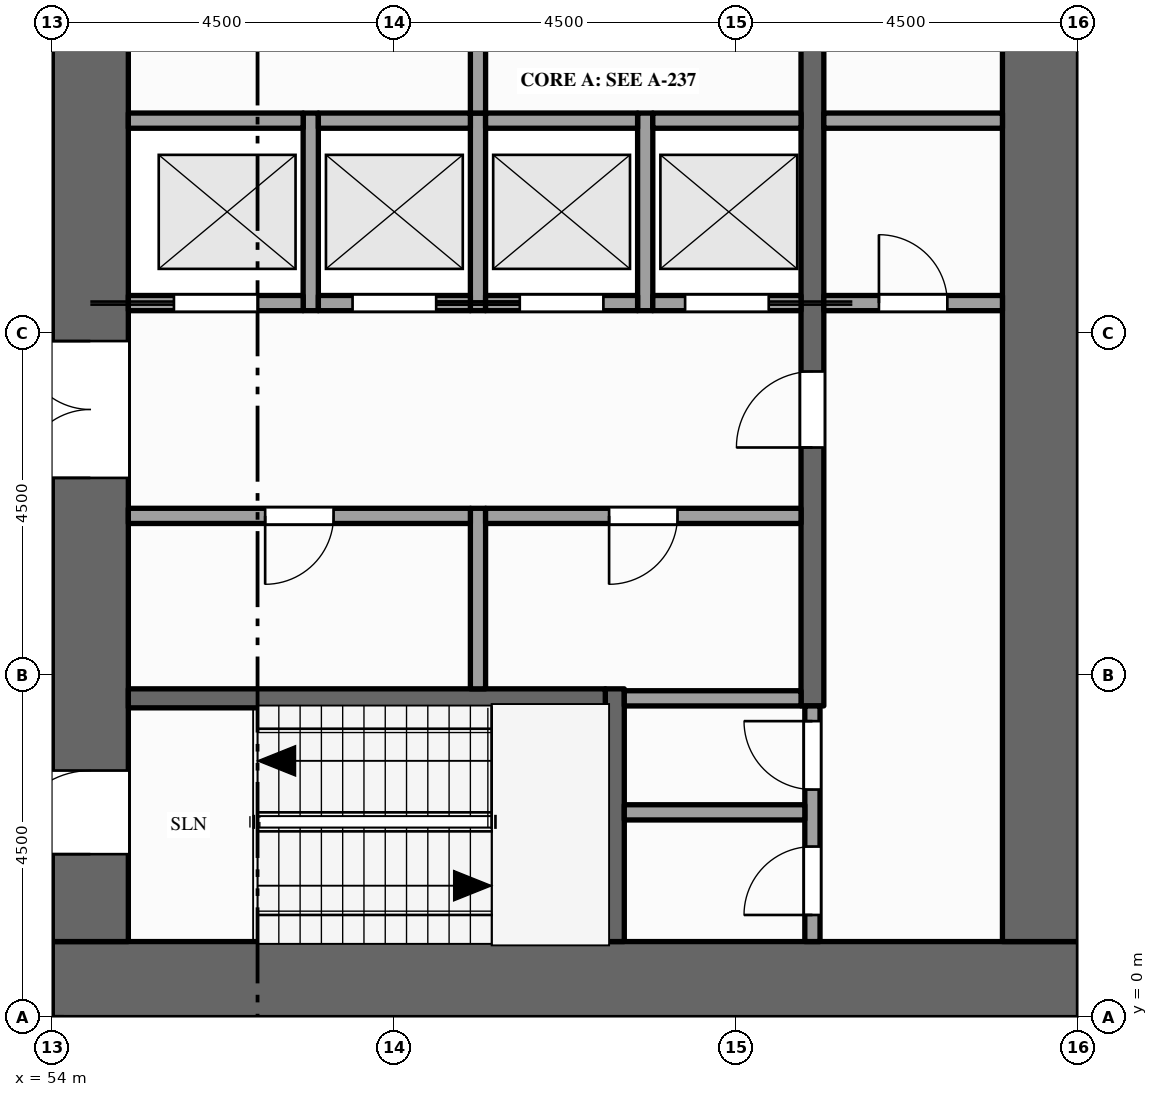
"""IFC4 building model, lengths in metres.
Left out: names, types, materials, properties, quantities, classifications, styles, units other than length and angle.
Written with IfcOpenShell. Run it as: python <this file> out.ifc"""

import sys

from ifc_helpers import new_model, si_unit, direction, frame, frame_2d, origin, place, context, subcontext, project, spatial, rectangle, extrude, element, fill, save


model = new_model("IFC4")
c1 = context("Model", 3, precision=1e-05, world=origin(), true_north=direction((0.0, 1.0)))
c2 = subcontext(c1, "Body", "Model", "MODEL_VIEW")
j1 = project(units=[si_unit("LENGTHUNIT", "METRE"), si_unit("PLANEANGLEUNIT", "RADIAN")], contexts=[c1])
p1 = place(None, origin())
s1 = spatial("IfcSite", under=j1, at=p1, CompositionType="ELEMENT")
p2 = place(p1, origin())
s2 = spatial("IfcBuilding", under=s1, at=p2, CompositionType="ELEMENT")
p3 = place(p2, frame((0.0, 0.0, 207.0)))
s3 = spatial("IfcBuildingStorey", under=s2, at=p3, CompositionType="ELEMENT", Elevation=207.0)
p4 = place(p3, frame((67.5, 0.5, -0.15), z_axis=(0.0, 0.0, 1.0), x_axis=(-1.0, 0.0, 0.0)))
e1 = element("IfcWall", 1, at=p4, inside=s3, PredefinedType="SHEAR", context=c2, shape_type="SweptSolid", body=[
    extrude(rectangle(XDim=13.5, YDim=1.0, at=frame_2d((6.75, 0.0))), origin(), (0.0, 0.0, 1.0), 4.0),
])
p5 = place(p3, frame((54.5, 1.0, -0.15), z_axis=(0.0, 0.0, 1.0), x_axis=(0.0, 1.0, 0.0)))
e2 = element("IfcWall", 2, at=p5, inside=s3, PredefinedType="SHEAR", context=c2, shape_type="SweptSolid", body=[
    extrude(rectangle(XDim=20.5, YDim=1.0, at=frame_2d((10.25, 0.0))), origin(), (0.0, 0.0, 1.0), 4.0),
])
p6 = place(p5, frame((6.1, 0.0, 0.15)))
e3 = element("IfcOpeningElement", 3, at=p6, cuts=e2, PredefinedType="OPENING", context=c2, shape_type="SweptSolid", body=[
    extrude(rectangle(XDim=1.8, YDim=2.1, at=frame_2d((0.9, 1.05))), frame((0.0, 0.51, 0.0), z_axis=(0.0, -1.0, 0.0), x_axis=(1.0, 0.0, 0.0)), (0.0, 0.0, 1.0), 1.02),
])
p7 = place(p5, frame((12.15, 0.0, 0.15)))
e4 = element("IfcOpeningElement", 4, at=p7, cuts=e2, PredefinedType="OPENING", context=c2, shape_type="SweptSolid", body=[
    extrude(rectangle(XDim=1.1, YDim=2.1, at=frame_2d((0.55, 1.05))), frame((0.0, 0.51, 0.0), z_axis=(0.0, -1.0, 0.0), x_axis=(1.0, 0.0, 0.0)), (0.0, 0.0, 1.0), 1.02),
])
p8 = place(p5, frame((1.15, 0.0, 0.15)))
e5 = element("IfcOpeningElement", 5, at=p8, cuts=e2, PredefinedType="OPENING", context=c2, shape_type="SweptSolid", body=[
    extrude(rectangle(XDim=1.1, YDim=2.1, at=frame_2d((0.55, 1.05))), frame((0.0, 0.51, 0.0), z_axis=(0.0, -1.0, 0.0), x_axis=(1.0, 0.0, 0.0)), (0.0, 0.0, 1.0), 1.02),
])
p9 = place(p5, frame((18.35, 0.0, 0.15)))
e6 = element("IfcOpeningElement", 6, at=p9, cuts=e2, PredefinedType="OPENING", context=c2, shape_type="SweptSolid", body=[
    extrude(rectangle(XDim=1.1, YDim=2.1, at=frame_2d((0.55, 1.05))), frame((0.0, 0.51, 0.0), z_axis=(0.0, -1.0, 0.0), x_axis=(1.0, 0.0, 0.0)), (0.0, 0.0, 1.0), 1.02),
])
p10 = place(p3, frame((67.0, 1.0, -0.15), z_axis=(0.0, 0.0, 1.0), x_axis=(0.0, 1.0, 0.0)))
e7 = element("IfcWall", 7, at=p10, inside=s3, PredefinedType="SHEAR", context=c2, shape_type="SweptSolid", body=[
    extrude(rectangle(XDim=20.5, YDim=1.0, at=frame_2d((10.25, 0.0))), origin(), (0.0, 0.0, 1.0), 4.0),
])
p11 = place(p3, frame((57.4, 9.3, 0.0), z_axis=(0.0, 0.0, 1.0), x_axis=(0.0, 1.0, 0.0)))
e8 = element("IfcWall", 8, at=p11, inside=s3, PredefinedType="SOLIDWALL", context=c2, shape_type="SweptSolid", body=[
    extrude(rectangle(XDim=2.6, YDim=0.2, at=frame_2d((1.3, 0.0))), origin(), (0.0, 0.0, 1.0), 3.85),
])
p12 = place(p3, frame((59.6, 4.325, 0.0), z_axis=(0.0, 0.0, 1.0), x_axis=(0.0, 1.0, 0.0)))
e9 = element("IfcWall", 9, at=p12, inside=s3, PredefinedType="PARTITIONING", context=c2, shape_type="SweptSolid", body=[
    extrude(rectangle(XDim=2.375, YDim=0.2, at=frame_2d((1.188, 0.0))), origin(), (0.0, 0.0, 1.0), 3.85),
])
p13 = place(p3, frame((59.6, 9.3, 0.0), z_axis=(0.0, 0.0, 1.0), x_axis=(0.0, 1.0, 0.0)))
e10 = element("IfcWall", 10, at=p13, inside=s3, PredefinedType="SOLIDWALL", context=c2, shape_type="SweptSolid", body=[
    extrude(rectangle(XDim=2.6, YDim=0.2, at=frame_2d((1.3, 0.0))), origin(), (0.0, 0.0, 1.0), 3.85),
])
p14 = place(p3, frame((59.6, 11.9, 0.0), z_axis=(0.0, 0.0, 1.0), x_axis=(0.0, 1.0, 0.0)))
e11 = element("IfcWall", 11, at=p14, inside=s3, PredefinedType="PARTITIONING", context=c2, shape_type="SweptSolid", body=[
    extrude(rectangle(XDim=3.6, YDim=0.2, at=frame_2d((1.8, 0.0))), origin(), (0.0, 0.0, 1.0), 3.85),
])
p15 = place(p14, frame((1.3, 0.0, 0.0)))
e12 = element("IfcOpeningElement", 12, at=p15, cuts=e11, PredefinedType="OPENING", context=c2, shape_type="SweptSolid", body=[
    extrude(rectangle(XDim=1.0, YDim=2.1, at=frame_2d((0.5, 1.05))), frame((0.0, 0.11, 0.0), z_axis=(0.0, -1.0, 0.0), x_axis=(1.0, 0.0, 0.0)), (0.0, 0.0, 1.0), 0.22),
])
p16 = place(p3, frame((61.4, 1.0, 0.0), z_axis=(0.0, 0.0, 1.0), x_axis=(0.0, 1.0, 0.0)))
e13 = element("IfcWall", 13, at=p16, inside=s3, PredefinedType="SHEAR", context=c2, shape_type="SweptSolid", body=[
    extrude(rectangle(XDim=3.325, YDim=0.25, at=frame_2d((1.663, 0.0))), origin(), (0.0, 0.0, 1.0), 3.85),
])
p17 = place(p3, frame((61.8, 9.3, 0.0), z_axis=(0.0, 0.0, 1.0), x_axis=(0.0, 1.0, 0.0)))
e14 = element("IfcWall", 14, at=p17, inside=s3, PredefinedType="SOLIDWALL", context=c2, shape_type="SweptSolid", body=[
    extrude(rectangle(XDim=2.6, YDim=0.2, at=frame_2d((1.3, 0.0))), origin(), (0.0, 0.0, 1.0), 3.85),
])
p18 = place(p3, frame((64.0, 1.0, 0.0), z_axis=(0.0, 0.0, 1.0), x_axis=(0.0, 1.0, 0.0)))
e15 = element("IfcWall", 15, at=p18, inside=s3, PredefinedType="PARTITIONING", context=c2, shape_type="SweptSolid", body=[
    extrude(rectangle(XDim=3.1, YDim=0.2, at=frame_2d((1.55, 0.0))), origin(), (0.0, 0.0, 1.0), 3.85),
])
p19 = place(p18, frame((0.35, 0.0, 0.0)))
e16 = element("IfcOpeningElement", 16, at=p19, cuts=e15, PredefinedType="OPENING", context=c2, shape_type="SweptSolid", body=[
    extrude(rectangle(XDim=0.9, YDim=2.1, at=frame_2d((0.45, 1.05))), frame((0.0, 0.11, 0.0), z_axis=(0.0, -1.0, 0.0), x_axis=(1.0, 0.0, 0.0)), (0.0, 0.0, 1.0), 0.22),
])
p20 = place(p18, frame((2.0, 0.0, 0.0)))
e17 = element("IfcOpeningElement", 17, at=p20, cuts=e15, PredefinedType="OPENING", context=c2, shape_type="SweptSolid", body=[
    extrude(rectangle(XDim=0.9, YDim=2.1, at=frame_2d((0.45, 1.05))), frame((0.0, 0.11, 0.0), z_axis=(0.0, -1.0, 0.0), x_axis=(1.0, 0.0, 0.0)), (0.0, 0.0, 1.0), 0.22),
])
p21 = place(p3, frame((64.0, 4.1, 0.0), z_axis=(0.0, 0.0, 1.0), x_axis=(0.0, 1.0, 0.0)))
e18 = element("IfcWall", 18, at=p21, inside=s3, PredefinedType="SHEAR", context=c2, shape_type="SweptSolid", body=[
    extrude(rectangle(XDim=14.5, YDim=0.3, at=frame_2d((7.25, 0.0))), origin(), (0.0, 0.0, 1.0), 3.85),
])
p22 = place(p21, frame((3.4, 0.0, 0.0)))
e19 = element("IfcOpeningElement", 19, at=p22, cuts=e18, PredefinedType="OPENING", context=c2, shape_type="SweptSolid", body=[
    extrude(rectangle(XDim=1.0, YDim=2.1, at=frame_2d((0.5, 1.05))), frame((0.0, 0.16, 0.0), z_axis=(0.0, -1.0, 0.0), x_axis=(1.0, 0.0, 0.0)), (0.0, 0.0, 1.0), 0.32),
])
p23 = place(p21, frame((9.1, 0.0, 0.0)))
e20 = element("IfcOpeningElement", 20, at=p23, cuts=e18, PredefinedType="OPENING", context=c2, shape_type="SweptSolid", body=[
    extrude(rectangle(XDim=1.0, YDim=2.1, at=frame_2d((0.5, 1.05))), frame((0.0, 0.16, 0.0), z_axis=(0.0, -1.0, 0.0), x_axis=(1.0, 0.0, 0.0)), (0.0, 0.0, 1.0), 0.32),
])
p24 = place(p3, frame((61.525, 2.7, 0.0), z_axis=(0.0, 0.0, 1.0), x_axis=(1.0, 0.0, 0.0)))
e21 = element("IfcWall", 21, at=p24, inside=s3, PredefinedType="PARTITIONING", context=c2, shape_type="SweptSolid", body=[
    extrude(rectangle(XDim=2.375, YDim=0.2, at=frame_2d((1.188, 0.0))), origin(), (0.0, 0.0, 1.0), 3.85),
])
p25 = place(p3, frame((55.0, 4.2, 0.0), z_axis=(0.0, 0.0, 1.0), x_axis=(1.0, 0.0, 0.0)))
e22 = element("IfcWall", 22, at=p25, inside=s3, PredefinedType="SHEAR", context=c2, shape_type="SweptSolid", body=[
    extrude(rectangle(XDim=6.275, YDim=0.25, at=frame_2d((3.137, 0.0))), origin(), (0.0, 0.0, 1.0), 3.85),
])
p26 = place(p3, frame((61.525, 4.2, 0.0), z_axis=(0.0, 0.0, 1.0), x_axis=(1.0, 0.0, 0.0)))
e23 = element("IfcWall", 23, at=p26, inside=s3, PredefinedType="PARTITIONING", context=c2, shape_type="SweptSolid", body=[
    extrude(rectangle(XDim=2.325, YDim=0.2, at=frame_2d((1.163, 0.0))), origin(), (0.0, 0.0, 1.0), 3.85),
])
p27 = place(p3, frame((55.0, 6.6, 0.0), z_axis=(0.0, 0.0, 1.0), x_axis=(1.0, 0.0, 0.0)))
e24 = element("IfcWall", 24, at=p27, inside=s3, PredefinedType="PARTITIONING", context=c2, shape_type="SweptSolid", body=[
    extrude(rectangle(XDim=4.5, YDim=0.2, at=frame_2d((2.25, 0.0))), origin(), (0.0, 0.0, 1.0), 3.85),
])
p28 = place(p27, frame((1.8, 0.0, 0.0)))
e25 = element("IfcOpeningElement", 25, at=p28, cuts=e24, PredefinedType="OPENING", context=c2, shape_type="SweptSolid", body=[
    extrude(rectangle(XDim=0.9, YDim=2.1, at=frame_2d((0.45, 1.05))), frame((0.0, 0.11, 0.0), z_axis=(0.0, -1.0, 0.0), x_axis=(1.0, 0.0, 0.0)), (0.0, 0.0, 1.0), 0.22),
])
p29 = place(p3, frame((59.7, 6.6, 0.0), z_axis=(0.0, 0.0, 1.0), x_axis=(1.0, 0.0, 0.0)))
e26 = element("IfcWall", 26, at=p29, inside=s3, PredefinedType="PARTITIONING", context=c2, shape_type="SweptSolid", body=[
    extrude(rectangle(XDim=4.15, YDim=0.2, at=frame_2d((2.075, 0.0))), origin(), (0.0, 0.0, 1.0), 3.85),
])
p30 = place(p29, frame((1.625, 0.0, 0.0)))
e27 = element("IfcOpeningElement", 27, at=p30, cuts=e26, PredefinedType="OPENING", context=c2, shape_type="SweptSolid", body=[
    extrude(rectangle(XDim=0.9, YDim=2.1, at=frame_2d((0.45, 1.05))), frame((0.0, 0.11, 0.0), z_axis=(0.0, -1.0, 0.0), x_axis=(1.0, 0.0, 0.0)), (0.0, 0.0, 1.0), 0.22),
])
p31 = place(p3, frame((55.0, 9.4, 0.0), z_axis=(0.0, 0.0, 1.0), x_axis=(1.0, 0.0, 0.0)))
e28 = element("IfcWall", 28, at=p31, inside=s3, PredefinedType="SOLIDWALL", context=c2, shape_type="SweptSolid", body=[
    extrude(rectangle(XDim=2.3, YDim=0.2, at=frame_2d((1.15, 0.0))), origin(), (0.0, 0.0, 1.0), 3.85),
])
p32 = place(p31, frame((0.6, 0.0, 0.012)))
e29 = element("IfcOpeningElement", 29, at=p32, cuts=e28, PredefinedType="OPENING", context=c2, shape_type="SweptSolid", body=[
    extrude(rectangle(XDim=1.1, YDim=2.1, at=frame_2d((0.55, 1.05))), frame((0.0, 0.11, 0.0), z_axis=(0.0, -1.0, 0.0), x_axis=(1.0, 0.0, 0.0)), (0.0, 0.0, 1.0), 0.22),
])
p33 = place(p3, frame((57.5, 9.4, 0.0), z_axis=(0.0, 0.0, 1.0), x_axis=(1.0, 0.0, 0.0)))
e30 = element("IfcWall", 30, at=p33, inside=s3, PredefinedType="SOLIDWALL", context=c2, shape_type="SweptSolid", body=[
    extrude(rectangle(XDim=2.0, YDim=0.2, at=frame_2d((1.0, 0.0))), origin(), (0.0, 0.0, 1.0), 3.85),
])
p34 = place(p33, frame((0.45, 0.0, 0.012)))
e31 = element("IfcOpeningElement", 31, at=p34, cuts=e30, PredefinedType="OPENING", context=c2, shape_type="SweptSolid", body=[
    extrude(rectangle(XDim=1.1, YDim=2.1, at=frame_2d((0.55, 1.05))), frame((0.0, 0.11, 0.0), z_axis=(0.0, -1.0, 0.0), x_axis=(1.0, 0.0, 0.0)), (0.0, 0.0, 1.0), 0.22),
])
p35 = place(p3, frame((59.7, 9.4, 0.0), z_axis=(0.0, 0.0, 1.0), x_axis=(1.0, 0.0, 0.0)))
e32 = element("IfcWall", 32, at=p35, inside=s3, PredefinedType="SOLIDWALL", context=c2, shape_type="SweptSolid", body=[
    extrude(rectangle(XDim=2.0, YDim=0.2, at=frame_2d((1.0, 0.0))), origin(), (0.0, 0.0, 1.0), 3.85),
])
p36 = place(p35, frame((0.45, 0.0, 0.012)))
e33 = element("IfcOpeningElement", 33, at=p36, cuts=e32, PredefinedType="OPENING", context=c2, shape_type="SweptSolid", body=[
    extrude(rectangle(XDim=1.1, YDim=2.1, at=frame_2d((0.55, 1.05))), frame((0.0, 0.11, 0.0), z_axis=(0.0, -1.0, 0.0), x_axis=(1.0, 0.0, 0.0)), (0.0, 0.0, 1.0), 0.22),
])
p37 = place(p3, frame((61.9, 9.4, 0.0), z_axis=(0.0, 0.0, 1.0), x_axis=(1.0, 0.0, 0.0)))
e34 = element("IfcWall", 34, at=p37, inside=s3, PredefinedType="SOLIDWALL", context=c2, shape_type="SweptSolid", body=[
    extrude(rectangle(XDim=1.95, YDim=0.2, at=frame_2d((0.975, 0.0))), origin(), (0.0, 0.0, 1.0), 3.85),
])
p38 = place(p37, frame((0.425, 0.0, 0.012)))
e35 = element("IfcOpeningElement", 35, at=p38, cuts=e34, PredefinedType="OPENING", context=c2, shape_type="SweptSolid", body=[
    extrude(rectangle(XDim=1.1, YDim=2.1, at=frame_2d((0.55, 1.05))), frame((0.0, 0.11, 0.0), z_axis=(0.0, -1.0, 0.0), x_axis=(1.0, 0.0, 0.0)), (0.0, 0.0, 1.0), 0.22),
])
p39 = place(p3, frame((64.15, 9.4, 0.0), z_axis=(0.0, 0.0, 1.0), x_axis=(1.0, 0.0, 0.0)))
e36 = element("IfcWall", 36, at=p39, inside=s3, PredefinedType="PARTITIONING", context=c2, shape_type="SweptSolid", body=[
    extrude(rectangle(XDim=2.35, YDim=0.2, at=frame_2d((1.175, 0.0))), origin(), (0.0, 0.0, 1.0), 3.85),
])
p40 = place(p39, frame((0.725, 0.0, 0.0)))
e37 = element("IfcOpeningElement", 37, at=p40, cuts=e36, PredefinedType="OPENING", context=c2, shape_type="SweptSolid", body=[
    extrude(rectangle(XDim=0.9, YDim=2.1, at=frame_2d((0.45, 1.05))), frame((0.0, 0.11, 0.0), z_axis=(0.0, -1.0, 0.0), x_axis=(1.0, 0.0, 0.0)), (0.0, 0.0, 1.0), 0.22),
])
p41 = place(p3, frame((55.0, 11.8, 0.0), z_axis=(0.0, 0.0, 1.0), x_axis=(1.0, 0.0, 0.0)))
e38 = element("IfcWall", 38, at=p41, inside=s3, PredefinedType="SOLIDWALL", context=c2, shape_type="SweptSolid", body=[
    extrude(rectangle(XDim=2.3, YDim=0.2, at=frame_2d((1.15, 0.0))), origin(), (0.0, 0.0, 1.0), 3.85),
])
for number, where, z_axis, x_axis in (
    (39, (57.5, 11.8, 0.0), (0.0, 0.0, 1.0), (1.0, 0.0, 0.0)),
    (40, (59.7, 11.8, 0.0), (0.0, 0.0, 1.0), (1.0, 0.0, 0.0)),
):
    element("IfcWall", number, at=place(p3, frame(where, z_axis=z_axis, x_axis=x_axis)), inside=s3, PredefinedType="SOLIDWALL", context=c2, shape_type="SweptSolid", body=[
        extrude(rectangle(XDim=2.0, YDim=0.2, at=frame_2d((1.0, 0.0))), origin(), (0.0, 0.0, 1.0), 3.85),
    ])
p42 = place(p3, frame((61.9, 11.8, 0.0), z_axis=(0.0, 0.0, 1.0), x_axis=(1.0, 0.0, 0.0)))
e41 = element("IfcWall", 41, at=p42, inside=s3, PredefinedType="SOLIDWALL", context=c2, shape_type="SweptSolid", body=[
    extrude(rectangle(XDim=1.95, YDim=0.2, at=frame_2d((0.975, 0.0))), origin(), (0.0, 0.0, 1.0), 3.85),
])
p43 = place(p3, frame((64.15, 11.8, 0.0), z_axis=(0.0, 0.0, 1.0), x_axis=(1.0, 0.0, 0.0)))
e42 = element("IfcWall", 42, at=p43, inside=s3, PredefinedType="PARTITIONING", context=c2, shape_type="SweptSolid", body=[
    extrude(rectangle(XDim=2.35, YDim=0.2, at=frame_2d((1.175, 0.0))), origin(), (0.0, 0.0, 1.0), 3.85),
])
p44 = place(p32, origin())
e43 = element("IfcDoor", 43, at=p44, inside=s3, OperationType="SLIDING_TO_LEFT", PredefinedType="DOOR", context=c2, shape_type="SweptSolid", body=[
    extrude(rectangle(XDim=1.1, YDim=2.1, at=frame_2d((0.55, 1.05))), frame((0.0, 0.025, 0.0), z_axis=(0.0, -1.0, 0.0), x_axis=(1.0, 0.0, 0.0)), (0.0, 0.0, 1.0), 0.05),
])
fill(e29, e43)
p45 = place(p34, origin())
e44 = element("IfcDoor", 44, at=p45, inside=s3, OperationType="SLIDING_TO_RIGHT", PredefinedType="DOOR", context=c2, shape_type="SweptSolid", body=[
    extrude(rectangle(XDim=1.1, YDim=2.1, at=frame_2d((0.55, 1.05))), frame((0.0, 0.025, 0.0), z_axis=(0.0, -1.0, 0.0), x_axis=(1.0, 0.0, 0.0)), (0.0, 0.0, 1.0), 0.05),
])
fill(e31, e44)
p46 = place(p36, origin())
e45 = element("IfcDoor", 45, at=p46, inside=s3, OperationType="SLIDING_TO_LEFT", PredefinedType="DOOR", context=c2, shape_type="SweptSolid", body=[
    extrude(rectangle(XDim=1.1, YDim=2.1, at=frame_2d((0.55, 1.05))), frame((0.0, 0.025, 0.0), z_axis=(0.0, -1.0, 0.0), x_axis=(1.0, 0.0, 0.0)), (0.0, 0.0, 1.0), 0.05),
])
fill(e33, e45)
p47 = place(p38, origin())
e46 = element("IfcDoor", 46, at=p47, inside=s3, OperationType="SLIDING_TO_RIGHT", PredefinedType="DOOR", context=c2, shape_type="SweptSolid", body=[
    extrude(rectangle(XDim=1.1, YDim=2.1, at=frame_2d((0.55, 1.05))), frame((0.0, 0.025, 0.0), z_axis=(0.0, -1.0, 0.0), x_axis=(1.0, 0.0, 0.0)), (0.0, 0.0, 1.0), 0.05),
])
fill(e35, e46)
p48 = place(p6, origin())
e47 = element("IfcDoor", 47, at=p48, inside=s3, OperationType="DOUBLE_DOOR_SINGLE_SWING", PredefinedType="DOOR", context=c2, shape_type="SweptSolid", body=[
    extrude(rectangle(XDim=1.8, YDim=2.1, at=frame_2d((0.9, 1.05))), frame((0.0, 0.025, 0.0), z_axis=(0.0, -1.0, 0.0), x_axis=(1.0, 0.0, 0.0)), (0.0, 0.0, 1.0), 0.05),
])
fill(e3, e47)
p49 = place(p22, origin())
e48 = element("IfcDoor", 48, at=p49, inside=s3, OperationType="SINGLE_SWING_LEFT", PredefinedType="DOOR", context=c2, shape_type="SweptSolid", body=[
    extrude(rectangle(XDim=1.0, YDim=2.1, at=frame_2d((0.5, 1.05))), frame((0.0, 0.025, 0.0), z_axis=(0.0, -1.0, 0.0), x_axis=(1.0, 0.0, 0.0)), (0.0, 0.0, 1.0), 0.05),
])
fill(e19, e48)
p50 = place(p40, origin())
e49 = element("IfcDoor", 49, at=p50, inside=s3, OperationType="SINGLE_SWING_LEFT", PredefinedType="DOOR", context=c2, shape_type="SweptSolid", body=[
    extrude(rectangle(XDim=0.9, YDim=2.1, at=frame_2d((0.45, 1.05))), frame((0.0, 0.025, 0.0), z_axis=(0.0, -1.0, 0.0), x_axis=(1.0, 0.0, 0.0)), (0.0, 0.0, 1.0), 0.05),
])
fill(e37, e49)
p51 = place(p8, origin())
e50 = element("IfcDoor", 50, at=p51, inside=s3, OperationType="SINGLE_SWING_LEFT", PredefinedType="DOOR", context=c2, shape_type="SweptSolid", body=[
    extrude(rectangle(XDim=1.1, YDim=2.1, at=frame_2d((0.55, 1.05))), frame((0.0, 0.025, 0.0), z_axis=(0.0, -1.0, 0.0), x_axis=(1.0, 0.0, 0.0)), (0.0, 0.0, 1.0), 0.05),
])
fill(e5, e50)
p52 = place(p19, origin())
e51 = element("IfcDoor", 51, at=p52, inside=s3, OperationType="SINGLE_SWING_LEFT", PredefinedType="DOOR", context=c2, shape_type="SweptSolid", body=[
    extrude(rectangle(XDim=0.9, YDim=2.1, at=frame_2d((0.45, 1.05))), frame((0.0, 0.025, 0.0), z_axis=(0.0, -1.0, 0.0), x_axis=(1.0, 0.0, 0.0)), (0.0, 0.0, 1.0), 0.05),
])
fill(e16, e51)
p53 = place(p20, origin())
e52 = element("IfcDoor", 52, at=p53, inside=s3, OperationType="SINGLE_SWING_RIGHT", PredefinedType="DOOR", context=c2, shape_type="SweptSolid", body=[
    extrude(rectangle(XDim=0.9, YDim=2.1, at=frame_2d((0.45, 1.05))), frame((0.0, 0.025, 0.0), z_axis=(0.0, -1.0, 0.0), x_axis=(1.0, 0.0, 0.0)), (0.0, 0.0, 1.0), 0.05),
])
fill(e17, e52)
p54 = place(p28, origin())
e53 = element("IfcDoor", 53, at=p54, inside=s3, OperationType="SINGLE_SWING_LEFT", PredefinedType="DOOR", context=c2, shape_type="SweptSolid", body=[
    extrude(rectangle(XDim=0.9, YDim=2.1, at=frame_2d((0.45, 1.05))), frame((0.0, 0.025, 0.0), z_axis=(0.0, -1.0, 0.0), x_axis=(1.0, 0.0, 0.0)), (0.0, 0.0, 1.0), 0.05),
])
fill(e25, e53)
p55 = place(p30, origin())
e54 = element("IfcDoor", 54, at=p55, inside=s3, OperationType="SINGLE_SWING_LEFT", PredefinedType="DOOR", context=c2, shape_type="SweptSolid", body=[
    extrude(rectangle(XDim=0.9, YDim=2.1, at=frame_2d((0.45, 1.05))), frame((0.0, 0.025, 0.0), z_axis=(0.0, -1.0, 0.0), x_axis=(1.0, 0.0, 0.0)), (0.0, 0.0, 1.0), 0.05),
])
fill(e27, e54)
save(model, sys.argv[1])
